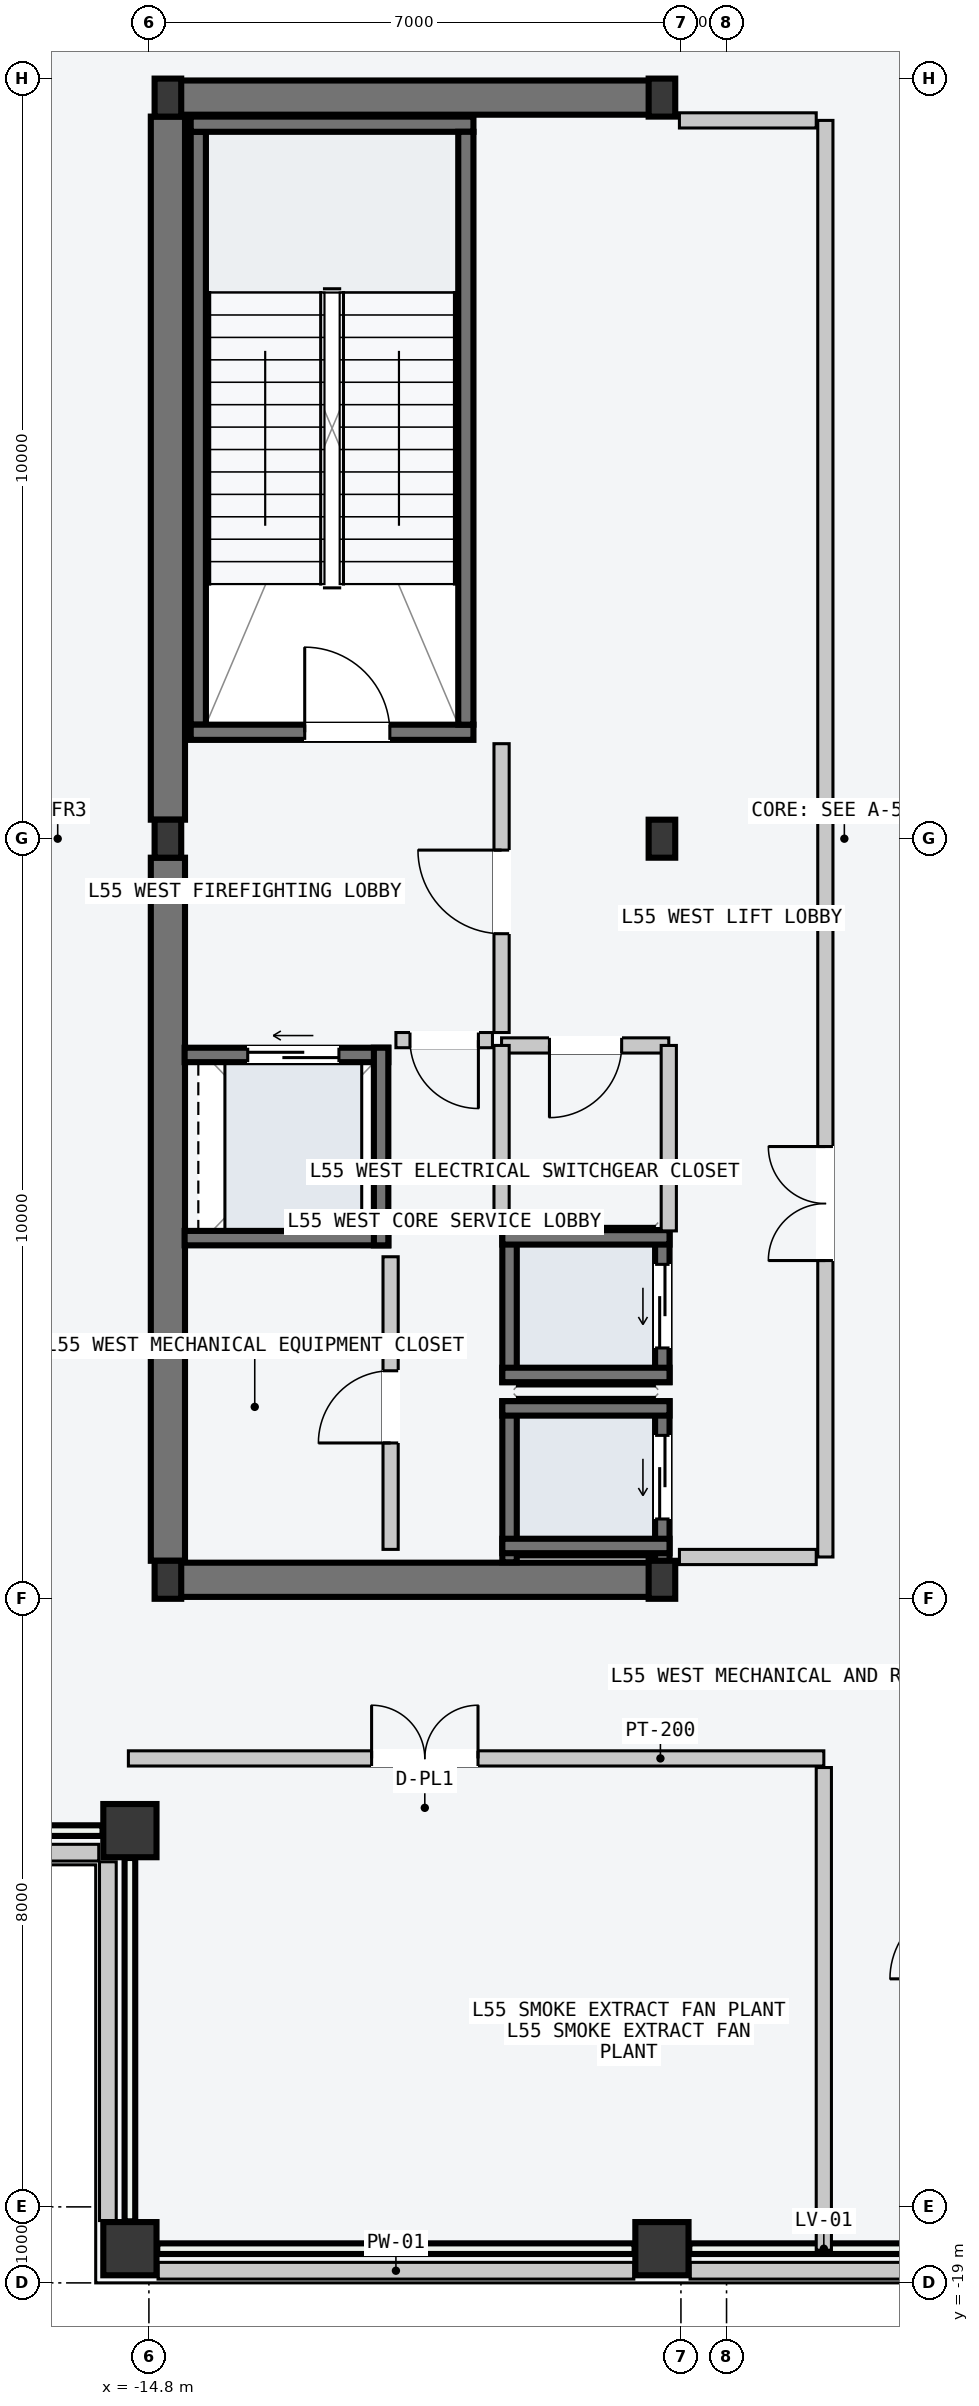
"""IFC4 building model, lengths in metres.
Left out: names, types, materials, properties, quantities, classifications, styles, units other than length and angle.
Written with IfcOpenShell. Run it as: python <this file> out.ifc"""

import sys

from ifc_helpers import new_model, si_unit, direction, frame, frame_2d, origin, origin_2d, place, context, subcontext, project, spatial, rectangle, hollow_rectangle, i_section, extrude, element, fill, save


model = new_model("IFC4")
c1 = context("Model", 3, precision=1e-05, world=origin(), true_north=direction((0.0, 1.0)))
c2 = subcontext(c1, "Body", "Model", "MODEL_VIEW")
j1 = project(units=[si_unit("LENGTHUNIT", "METRE"), si_unit("PLANEANGLEUNIT", "RADIAN")], contexts=[c1])
p1 = place(None, origin())
s1 = spatial("IfcSite", under=j1, at=p1, CompositionType="ELEMENT")
p2 = place(p1, origin())
s2 = spatial("IfcBuilding", under=s1, at=p2, CompositionType="ELEMENT")
p3 = place(p2, frame((0.0, 0.0, 209.1)))
s3 = spatial("IfcBuildingStorey", under=s2, at=p3, CompositionType="ELEMENT", Elevation=209.1)
for number, where, z_axis, x_axis in (
    (1, (-14.53, -9.75, -0.2), (0.0, 0.0, 1.0), (1.0, 0.0, 0.0)),
    (2, (-14.53, 9.75, -0.2), (0.0, 0.0, 1.0), (1.0, 0.0, 0.0)),
):
    element("IfcWall", number, at=place(p3, frame(where, z_axis=z_axis, x_axis=x_axis)), inside=s3, PredefinedType="SHEAR", context=c2, shape_type="SweptSolid", body=[
        extrude(rectangle(XDim=6.46, YDim=0.45, at=frame_2d((3.23, 0.0))), origin(), (0.0, 0.0, 1.0), 4.8),
    ])
for number, where, z_axis, x_axis in (
    (3, (-14.55, -9.5, -0.2), (0.0, 0.0, 1.0), (0.0, 1.0, 0.0)),
    (4, (-14.55, 0.25, -0.2), (0.0, 0.0, 1.0), (0.0, 1.0, 0.0)),
):
    element("IfcWall", number, at=place(p3, frame(where, z_axis=z_axis, x_axis=x_axis)), inside=s3, PredefinedType="SHEAR", context=c2, shape_type="SweptSolid", body=[
        extrude(rectangle(XDim=9.25, YDim=0.45, at=frame_2d((4.625, 0.0))), origin(), (0.0, 0.0, 1.0), 4.8),
    ])
p4 = place(p3, frame((-14.15, 1.5, -0.2), z_axis=(0.0, 0.0, 1.0), x_axis=(0.0, 1.0, 0.0)))
e5 = element("IfcWall", 5, at=p4, inside=s3, PredefinedType="SOLIDWALL", context=c2, shape_type="SweptSolid", body=[
    extrude(rectangle(XDim=7.8, YDim=0.2, at=frame_2d((3.9, 0.0))), origin(), (0.0, 0.0, 1.0), 4.8),
])
p5 = place(p3, frame((-14.25, 1.4, -0.2), z_axis=(0.0, 0.0, 1.0), x_axis=(1.0, 0.0, 0.0)))
e6 = element("IfcWall", 6, at=p5, inside=s3, PredefinedType="SOLIDWALL", context=c2, shape_type="SweptSolid", body=[
    extrude(rectangle(XDim=3.72, YDim=0.2, at=frame_2d((1.86, 0.0))), origin(), (0.0, 0.0, 1.0), 4.8),
])
p6 = place(p5, frame((1.5, 0.0, 0.2)))
e7 = element("IfcOpeningElement", 7, at=p6, cuts=e6, PredefinedType="OPENING", context=c2, shape_type="SweptSolid", body=[
    extrude(rectangle(XDim=1.12, YDim=2.18, at=frame_2d((0.56, 1.09))), frame((0.0, 0.11, 0.0), z_axis=(0.0, -1.0, 0.0), x_axis=(1.0, 0.0, 0.0)), (0.0, 0.0, 1.0), 0.22),
])
p7 = place(p3, frame((-14.25, 9.4, -0.2), z_axis=(0.0, 0.0, 1.0), x_axis=(1.0, 0.0, 0.0)))
e8 = element("IfcWall", 8, at=p7, inside=s3, PredefinedType="SOLIDWALL", context=c2, shape_type="SweptSolid", body=[
    extrude(rectangle(XDim=3.72, YDim=0.2, at=frame_2d((1.86, 0.0))), origin(), (0.0, 0.0, 1.0), 4.8),
])
p8 = place(p3, frame((-10.63, 1.5, -0.2), z_axis=(0.0, 0.0, 1.0), x_axis=(0.0, 1.0, 0.0)))
e9 = element("IfcWall", 9, at=p8, inside=s3, PredefinedType="SOLIDWALL", context=c2, shape_type="SweptSolid", body=[
    extrude(rectangle(XDim=7.8, YDim=0.2, at=frame_2d((3.9, 0.0))), origin(), (0.0, 0.0, 1.0), 4.8),
])
for number, where, z_axis, x_axis in (
    (10, (-14.55, -9.75, 0.0), (0.0, 0.0, 1.0), (1.0, 0.0, 0.0)),
    (11, (-14.55, 0.0, 0.0), (0.0, 0.0, 1.0), (1.0, 0.0, 0.0)),
    (12, (-14.55, 9.75, 0.0), (0.0, 0.0, 1.0), (1.0, 0.0, 0.0)),
    (13, (-8.05, -9.75, 0.0), (0.0, 0.0, 1.0), (1.0, 0.0, 0.0)),
    (14, (-8.05, 0.0, 0.0), (0.0, 0.0, 1.0), (1.0, 0.0, 0.0)),
    (15, (-8.05, 9.75, 0.0), (0.0, 0.0, 1.0), (1.0, 0.0, 0.0)),
):
    element("IfcColumn", number, at=place(p3, frame(where, z_axis=z_axis, x_axis=x_axis)), inside=s3, PredefinedType="COLUMN", context=c2, shape_type="SweptSolid", body=[
        extrude(i_section(OverallWidth=0.35, OverallDepth=0.5, WebThickness=0.02, FlangeThickness=0.032, at=origin_2d()), origin(), (0.0, 0.0, 1.0), 4.8),
    ])
for number, where, z_axis, x_axis in (
    (16, (-15.05, -18.55, 0.0), (0.0, 0.0, 1.0), (1.0, 0.0, 0.0)),
    (17, (-8.05, -18.55, 0.0), (0.0, 0.0, 1.0), (1.0, 0.0, 0.0)),
    (18, (-15.05, -13.05, 0.0), (0.0, 0.0, 1.0), (1.0, 0.0, 0.0)),
):
    element("IfcColumn", number, at=place(p3, frame(where, z_axis=z_axis, x_axis=x_axis)), inside=s3, PredefinedType="COLUMN", context=c2, shape_type="SweptSolid", body=[
        extrude(hollow_rectangle(XDim=0.7, YDim=0.7, WallThickness=0.03, at=origin_2d()), origin(), (0.0, 0.0, 1.0), 4.8),
    ])
p9 = place(p3, frame((-14.68, -18.84, 0.0), z_axis=(0.0, 0.0, 1.0), x_axis=(1.0, 0.0, 0.0)))
e19 = element("IfcWall", 19, at=p9, inside=s3, PredefinedType="PARAPET", context=c2, shape_type="SweptSolid", body=[
    extrude(rectangle(XDim=6.26, YDim=0.22, at=frame_2d((3.13, 0.0))), origin(), (0.0, 0.0, 1.0), 1.2),
])
p10 = place(p3, frame((-7.68, -18.84, 0.0), z_axis=(0.0, 0.0, 1.0), x_axis=(1.0, 0.0, 0.0)))
e20 = element("IfcWall", 20, at=p10, inside=s3, PredefinedType="PARAPET", context=c2, shape_type="SweptSolid", body=[
    extrude(rectangle(XDim=3.36, YDim=0.22, at=frame_2d((1.68, 0.0))), origin(), (0.0, 0.0, 1.0), 1.2),
])
for number, where, z_axis, x_axis in (
    (21, (-15.34, -18.18, 0.0), (0.0, 0.0, 1.0), (0.0, 1.0, 0.0)),
    (22, (-20.18, -13.34, 0.0), (0.0, 0.0, 1.0), (1.0, 0.0, 0.0)),
):
    element("IfcWall", number, at=place(p3, frame(where, z_axis=z_axis, x_axis=x_axis)), inside=s3, PredefinedType="PARAPET", context=c2, shape_type="SweptSolid", body=[
        extrude(rectangle(XDim=4.72, YDim=0.22, at=frame_2d((2.36, 0.0))), origin(), (0.0, 0.0, 1.0), 1.2),
    ])
p11 = place(p3, frame((-8.045, -9.52, -0.2), z_axis=(0.0, 0.0, 1.0), x_axis=(0.0, 1.0, 0.0)))
e23 = element("IfcWall", 23, at=p11, inside=s3, PredefinedType="SOLIDWALL", context=c2, shape_type="SweptSolid", body=[
    extrude(rectangle(XDim=2.12, YDim=0.19, at=frame_2d((1.06, 0.0))), origin(), (0.0, 0.0, 1.0), 4.8),
])
p12 = place(p11, frame((0.57, 0.0, 0.2)))
e24 = element("IfcOpeningElement", 24, at=p12, cuts=e23, PredefinedType="OPENING", context=c2, shape_type="SweptSolid", body=[
    extrude(rectangle(XDim=1.1, YDim=2.2, at=frame_2d((0.55, 1.1))), frame((0.0, 0.105, 0.0), z_axis=(0.0, -1.0, 0.0), x_axis=(1.0, 0.0, 0.0)), (0.0, 0.0, 1.0), 0.21),
])
p13 = place(p3, frame((-10.055, -9.52, -0.2), z_axis=(0.0, 0.0, 1.0), x_axis=(0.0, 1.0, 0.0)))
e25 = element("IfcWall", 25, at=p13, inside=s3, PredefinedType="SOLIDWALL", context=c2, shape_type="SweptSolid", body=[
    extrude(rectangle(XDim=2.12, YDim=0.19, at=frame_2d((1.06, 0.0))), origin(), (0.0, 0.0, 1.0), 4.8),
])
for number, where, z_axis, x_axis in (
    (26, (-10.15, -7.495, -0.2), (0.0, 0.0, 1.0), (1.0, 0.0, 0.0)),
    (27, (-10.15, -9.305, -0.2), (0.0, 0.0, 1.0), (1.0, 0.0, 0.0)),
):
    element("IfcWall", number, at=place(p3, frame(where, z_axis=z_axis, x_axis=x_axis)), inside=s3, PredefinedType="SOLIDWALL", context=c2, shape_type="SweptSolid", body=[
        extrude(rectangle(XDim=2.2, YDim=0.19, at=frame_2d((1.1, 0.0))), origin(), (0.0, 0.0, 1.0), 4.8),
    ])
p14 = place(p3, frame((-8.045, -7.15, -0.2), z_axis=(0.0, 0.0, 1.0), x_axis=(0.0, 1.0, 0.0)))
e28 = element("IfcWall", 28, at=p14, inside=s3, PredefinedType="SOLIDWALL", context=c2, shape_type="SweptSolid", body=[
    extrude(rectangle(XDim=2.0, YDim=0.19, at=frame_2d((1.0, 0.0))), origin(), (0.0, 0.0, 1.0), 4.8),
])
p15 = place(p14, frame((0.45, 0.0, 0.2)))
e29 = element("IfcOpeningElement", 29, at=p15, cuts=e28, PredefinedType="OPENING", context=c2, shape_type="SweptSolid", body=[
    extrude(rectangle(XDim=1.1, YDim=2.2, at=frame_2d((0.55, 1.1))), frame((0.0, 0.105, 0.0), z_axis=(0.0, -1.0, 0.0), x_axis=(1.0, 0.0, 0.0)), (0.0, 0.0, 1.0), 0.21),
])
p16 = place(p3, frame((-10.055, -7.15, -0.2), z_axis=(0.0, 0.0, 1.0), x_axis=(0.0, 1.0, 0.0)))
e30 = element("IfcWall", 30, at=p16, inside=s3, PredefinedType="SOLIDWALL", context=c2, shape_type="SweptSolid", body=[
    extrude(rectangle(XDim=2.0, YDim=0.19, at=frame_2d((1.0, 0.0))), origin(), (0.0, 0.0, 1.0), 4.8),
])
for number, where, z_axis, x_axis in (
    (31, (-10.15, -5.245, -0.2), (0.0, 0.0, 1.0), (1.0, 0.0, 0.0)),
    (32, (-10.15, -7.055, -0.2), (0.0, 0.0, 1.0), (1.0, 0.0, 0.0)),
):
    element("IfcWall", number, at=place(p3, frame(where, z_axis=z_axis, x_axis=x_axis)), inside=s3, PredefinedType="SOLIDWALL", context=c2, shape_type="SweptSolid", body=[
        extrude(rectangle(XDim=2.2, YDim=0.19, at=frame_2d((1.1, 0.0))), origin(), (0.0, 0.0, 1.0), 4.8),
    ])
p17 = place(p3, frame((-14.33, -2.845, -0.2), z_axis=(0.0, 0.0, 1.0), x_axis=(1.0, 0.0, 0.0)))
e33 = element("IfcWall", 33, at=p17, inside=s3, PredefinedType="SOLIDWALL", context=c2, shape_type="SweptSolid", body=[
    extrude(rectangle(XDim=2.68, YDim=0.19, at=frame_2d((1.34, 0.0))), origin(), (0.0, 0.0, 1.0), 4.8),
])
p18 = place(p17, frame((0.83, 0.0, 0.2)))
e34 = element("IfcOpeningElement", 34, at=p18, cuts=e33, PredefinedType="OPENING", context=c2, shape_type="SweptSolid", body=[
    extrude(rectangle(XDim=1.2, YDim=2.2, at=frame_2d((0.6, 1.1))), frame((0.0, 0.105, 0.0), z_axis=(0.0, -1.0, 0.0), x_axis=(1.0, 0.0, 0.0)), (0.0, 0.0, 1.0), 0.21),
])
p19 = place(p3, frame((-14.33, -5.255, -0.2), z_axis=(0.0, 0.0, 1.0), x_axis=(1.0, 0.0, 0.0)))
e35 = element("IfcWall", 35, at=p19, inside=s3, PredefinedType="SOLIDWALL", context=c2, shape_type="SweptSolid", body=[
    extrude(rectangle(XDim=2.68, YDim=0.19, at=frame_2d((1.34, 0.0))), origin(), (0.0, 0.0, 1.0), 4.8),
])
p20 = place(p3, frame((-11.745, -5.35, -0.2), z_axis=(0.0, 0.0, 1.0), x_axis=(0.0, 1.0, 0.0)))
e36 = element("IfcWall", 36, at=p20, inside=s3, PredefinedType="SOLIDWALL", context=c2, shape_type="SweptSolid", body=[
    extrude(rectangle(XDim=2.6, YDim=0.19, at=frame_2d((1.3, 0.0))), origin(), (0.0, 0.0, 1.0), 4.8),
])
p21 = place(p3, frame((-5.9, -9.45, 0.0), z_axis=(0.0, 0.0, 1.0), x_axis=(0.0, 1.0, 0.0)))
e37 = element("IfcWall", 37, at=p21, inside=s3, PredefinedType="PARTITIONING", context=c2, shape_type="SweptSolid", body=[
    extrude(rectangle(XDim=18.9, YDim=0.2, at=frame_2d((9.45, 0.0))), origin(), (0.0, 0.0, 1.0), 4.6),
])
p22 = place(p21, frame((3.9, 0.0, 0.0)))
e38 = element("IfcOpeningElement", 38, at=p22, cuts=e37, PredefinedType="OPENING", context=c2, shape_type="SweptSolid", body=[
    extrude(rectangle(XDim=1.5, YDim=2.2, at=frame_2d((0.75, 1.1))), frame((0.0, 0.11, 0.0), z_axis=(0.0, -1.0, 0.0), x_axis=(1.0, 0.0, 0.0)), (0.0, 0.0, 1.0), 0.22),
])
for number, where, z_axis, x_axis in (
    (39, (-6.02, -9.45, 0.0), (0.0, 0.0, 1.0), (-1.0, 0.0, 0.0)),
    (40, (-6.02, 9.45, 0.0), (0.0, 0.0, 1.0), (-1.0, 0.0, 0.0)),
):
    element("IfcWall", number, at=place(p3, frame(where, z_axis=z_axis, x_axis=x_axis)), inside=s3, PredefinedType="PARTITIONING", context=c2, shape_type="SweptSolid", body=[
        extrude(rectangle(XDim=1.8, YDim=0.2, at=frame_2d((0.9, 0.0))), origin(), (0.0, 0.0, 1.0), 2.96),
    ])
p23 = place(p3, frame((-10.16, -2.55, 0.0), z_axis=(0.0, 0.0, 1.0), x_axis=(0.0, 1.0, 0.0)))
e41 = element("IfcWall", 41, at=p23, inside=s3, PredefinedType="PARTITIONING", context=c2, shape_type="SweptSolid", body=[
    extrude(rectangle(XDim=3.8, YDim=0.2, at=frame_2d((1.9, 0.0))), origin(), (0.0, 0.0, 1.0), 4.6),
])
p24 = place(p23, frame((1.3, 0.0, 0.0)))
e42 = element("IfcOpeningElement", 42, at=p24, cuts=e41, PredefinedType="OPENING", context=c2, shape_type="SweptSolid", body=[
    extrude(rectangle(XDim=1.1, YDim=2.15, at=frame_2d((0.55, 1.075))), frame((0.0, 0.11, 0.0), z_axis=(0.0, -1.0, 0.0), x_axis=(1.0, 0.0, 0.0)), (0.0, 0.0, 1.0), 0.22),
])
p25 = place(p3, frame((-10.28, -2.65, 0.0), z_axis=(0.0, 0.0, 1.0), x_axis=(-1.0, 0.0, 0.0)))
e43 = element("IfcWall", 43, at=p25, inside=s3, PredefinedType="PARTITIONING", context=c2, shape_type="SweptSolid", body=[
    extrude(rectangle(XDim=1.27, YDim=0.2, at=frame_2d((0.635, 0.0))), origin(), (0.0, 0.0, 1.0), 4.6),
])
p26 = place(p25, frame((0.185, 0.0, 0.0)))
e44 = element("IfcOpeningElement", 44, at=p26, cuts=e43, PredefinedType="OPENING", context=c2, shape_type="SweptSolid", body=[
    extrude(rectangle(XDim=0.9, YDim=2.15, at=frame_2d((0.45, 1.075))), frame((0.0, 0.11, 0.0), z_axis=(0.0, -1.0, 0.0), x_axis=(1.0, 0.0, 0.0)), (0.0, 0.0, 1.0), 0.22),
])
p27 = place(p3, frame((-7.96, -2.72, 0.0), z_axis=(0.0, 0.0, 1.0), x_axis=(-1.0, 0.0, 0.0)))
e45 = element("IfcWall", 45, at=p27, inside=s3, PredefinedType="PARTITIONING", context=c2, shape_type="SweptSolid", body=[
    extrude(rectangle(XDim=2.2, YDim=0.2, at=frame_2d((1.1, 0.0))), origin(), (0.0, 0.0, 1.0), 4.6),
])
p28 = place(p27, frame((0.62, 0.0, 0.0)))
e46 = element("IfcOpeningElement", 46, at=p28, cuts=e45, PredefinedType="OPENING", context=c2, shape_type="SweptSolid", body=[
    extrude(rectangle(XDim=0.95, YDim=2.1, at=frame_2d((0.475, 1.05))), frame((0.0, 0.11, 0.0), z_axis=(0.0, -1.0, 0.0), x_axis=(1.0, 0.0, 0.0)), (0.0, 0.0, 1.0), 0.22),
])
for number, where, z_axis, x_axis in (
    (47, (-7.96, -5.16, 0.0), (0.0, 0.0, 1.0), (0.0, 1.0, 0.0)),
    (48, (-10.16, -5.16, 0.0), (0.0, 0.0, 1.0), (0.0, 1.0, 0.0)),
):
    element("IfcWall", number, at=place(p3, frame(where, z_axis=z_axis, x_axis=x_axis)), inside=s3, PredefinedType="PARTITIONING", context=c2, shape_type="SweptSolid", body=[
        extrude(rectangle(XDim=2.44, YDim=0.2, at=frame_2d((1.22, 0.0))), origin(), (0.0, 0.0, 1.0), 4.6),
    ])
p29 = place(p3, frame((-11.62, -9.35, 0.0), z_axis=(0.0, 0.0, 1.0), x_axis=(0.0, 1.0, 0.0)))
e49 = element("IfcWall", 49, at=p29, inside=s3, PredefinedType="PARTITIONING", context=c2, shape_type="SweptSolid", body=[
    extrude(rectangle(XDim=3.85, YDim=0.2, at=frame_2d((1.925, 0.0))), origin(), (0.0, 0.0, 1.0), 4.6),
])
p30 = place(p29, frame((1.4, 0.0, 0.0)))
e50 = element("IfcOpeningElement", 50, at=p30, cuts=e49, PredefinedType="OPENING", context=c2, shape_type="SweptSolid", body=[
    extrude(rectangle(XDim=0.95, YDim=2.1, at=frame_2d((0.475, 1.05))), frame((0.0, 0.11, 0.0), z_axis=(0.0, -1.0, 0.0), x_axis=(1.0, 0.0, 0.0)), (0.0, 0.0, 1.0), 0.22),
])
p31 = place(p3, frame((-15.07, -12.1, 0.0), z_axis=(0.0, 0.0, 1.0), x_axis=(1.0, 0.0, 0.0)))
e51 = element("IfcWall", 51, at=p31, inside=s3, PredefinedType="PARTITIONING", context=c2, shape_type="SweptSolid", body=[
    extrude(rectangle(XDim=9.15, YDim=0.2, at=frame_2d((4.575, 0.0))), origin(), (0.0, 0.0, 1.0), 4.6),
])
p32 = place(p31, frame((3.2, 0.0, 0.0)))
e52 = element("IfcOpeningElement", 52, at=p32, cuts=e51, PredefinedType="OPENING", context=c2, shape_type="SweptSolid", body=[
    extrude(rectangle(XDim=1.4, YDim=2.25, at=frame_2d((0.7, 1.125))), frame((0.0, 0.11, 0.0), z_axis=(0.0, -1.0, 0.0), x_axis=(1.0, 0.0, 0.0)), (0.0, 0.0, 1.0), 0.22),
])
p33 = place(p3, frame((-5.92, -18.57, 0.0), z_axis=(0.0, 0.0, 1.0), x_axis=(0.0, 1.0, 0.0)))
e53 = element("IfcWall", 53, at=p33, inside=s3, PredefinedType="PARTITIONING", context=c2, shape_type="SweptSolid", body=[
    extrude(rectangle(XDim=6.35, YDim=0.2, at=frame_2d((3.175, 0.0))), origin(), (0.0, 0.0, 1.0), 4.6),
])
p34 = place(p6, origin())
e54 = element("IfcDoor", 54, at=p34, inside=s3, OperationType="SINGLE_SWING_LEFT", PredefinedType="DOOR", context=c2, shape_type="SweptSolid", body=[
    extrude(rectangle(XDim=1.12, YDim=2.18, at=frame_2d((0.56, 1.09))), frame((0.0, 0.025, 0.0), z_axis=(0.0, -1.0, 0.0), x_axis=(1.0, 0.0, 0.0)), (0.0, 0.0, 1.0), 0.05),
])
fill(e7, e54)
p35 = place(p12, origin())
e55 = element("IfcDoor", 55, at=p35, inside=s3, OperationType="SLIDING_TO_LEFT", PredefinedType="DOOR", context=c2, shape_type="SweptSolid", body=[
    extrude(rectangle(XDim=1.1, YDim=2.2, at=frame_2d((0.55, 1.1))), frame((0.0, 0.025, 0.0), z_axis=(0.0, -1.0, 0.0), x_axis=(1.0, 0.0, 0.0)), (0.0, 0.0, 1.0), 0.05),
])
fill(e24, e55)
p36 = place(p15, origin())
e56 = element("IfcDoor", 56, at=p36, inside=s3, OperationType="SLIDING_TO_LEFT", PredefinedType="DOOR", context=c2, shape_type="SweptSolid", body=[
    extrude(rectangle(XDim=1.1, YDim=2.2, at=frame_2d((0.55, 1.1))), frame((0.0, 0.025, 0.0), z_axis=(0.0, -1.0, 0.0), x_axis=(1.0, 0.0, 0.0)), (0.0, 0.0, 1.0), 0.05),
])
fill(e29, e56)
p37 = place(p18, origin())
e57 = element("IfcDoor", 57, at=p37, inside=s3, OperationType="SLIDING_TO_LEFT", PredefinedType="DOOR", context=c2, shape_type="SweptSolid", body=[
    extrude(rectangle(XDim=1.2, YDim=2.2, at=frame_2d((0.6, 1.1))), frame((0.0, 0.025, 0.0), z_axis=(0.0, -1.0, 0.0), x_axis=(1.0, 0.0, 0.0)), (0.0, 0.0, 1.0), 0.05),
])
fill(e34, e57)
p38 = place(p22, origin())
e58 = element("IfcDoor", 58, at=p38, inside=s3, OperationType="DOUBLE_DOOR_SINGLE_SWING", PredefinedType="DOOR", context=c2, shape_type="SweptSolid", body=[
    extrude(rectangle(XDim=1.5, YDim=2.2, at=frame_2d((0.75, 1.1))), frame((0.0, 0.025, 0.0), z_axis=(0.0, -1.0, 0.0), x_axis=(1.0, 0.0, 0.0)), (0.0, 0.0, 1.0), 0.05),
])
fill(e38, e58)
p39 = place(p24, origin())
e59 = element("IfcDoor", 59, at=p39, inside=s3, OperationType="SINGLE_SWING_RIGHT", PredefinedType="DOOR", context=c2, shape_type="SweptSolid", body=[
    extrude(rectangle(XDim=1.1, YDim=2.15, at=frame_2d((0.55, 1.075))), frame((0.0, 0.025, 0.0), z_axis=(0.0, -1.0, 0.0), x_axis=(1.0, 0.0, 0.0)), (0.0, 0.0, 1.0), 0.05),
])
fill(e42, e59)
p40 = place(p26, origin())
e60 = element("IfcDoor", 60, at=p40, inside=s3, OperationType="SINGLE_SWING_LEFT", PredefinedType="DOOR", context=c2, shape_type="SweptSolid", body=[
    extrude(rectangle(XDim=0.9, YDim=2.15, at=frame_2d((0.45, 1.075))), frame((0.0, 0.025, 0.0), z_axis=(0.0, -1.0, 0.0), x_axis=(1.0, 0.0, 0.0)), (0.0, 0.0, 1.0), 0.05),
])
fill(e44, e60)
p41 = place(p28, origin())
e61 = element("IfcDoor", 61, at=p41, inside=s3, OperationType="SINGLE_SWING_RIGHT", PredefinedType="DOOR", context=c2, shape_type="SweptSolid", body=[
    extrude(rectangle(XDim=0.95, YDim=2.1, at=frame_2d((0.475, 1.05))), frame((0.0, 0.025, 0.0), z_axis=(0.0, -1.0, 0.0), x_axis=(1.0, 0.0, 0.0)), (0.0, 0.0, 1.0), 0.05),
])
fill(e46, e61)
p42 = place(p30, origin())
e62 = element("IfcDoor", 62, at=p42, inside=s3, OperationType="SINGLE_SWING_LEFT", PredefinedType="DOOR", context=c2, shape_type="SweptSolid", body=[
    extrude(rectangle(XDim=0.95, YDim=2.1, at=frame_2d((0.475, 1.05))), frame((0.0, 0.025, 0.0), z_axis=(0.0, -1.0, 0.0), x_axis=(1.0, 0.0, 0.0)), (0.0, 0.0, 1.0), 0.05),
])
fill(e50, e62)
p43 = place(p32, origin())
e63 = element("IfcDoor", 63, at=p43, inside=s3, OperationType="DOUBLE_DOOR_SINGLE_SWING", PredefinedType="DOOR", context=c2, shape_type="SweptSolid", body=[
    extrude(rectangle(XDim=1.4, YDim=2.25, at=frame_2d((0.7, 1.125))), frame((0.0, 0.025, 0.0), z_axis=(0.0, -1.0, 0.0), x_axis=(1.0, 0.0, 0.0)), (0.0, 0.0, 1.0), 0.05),
])
fill(e52, e63)
save(model, sys.argv[1])
